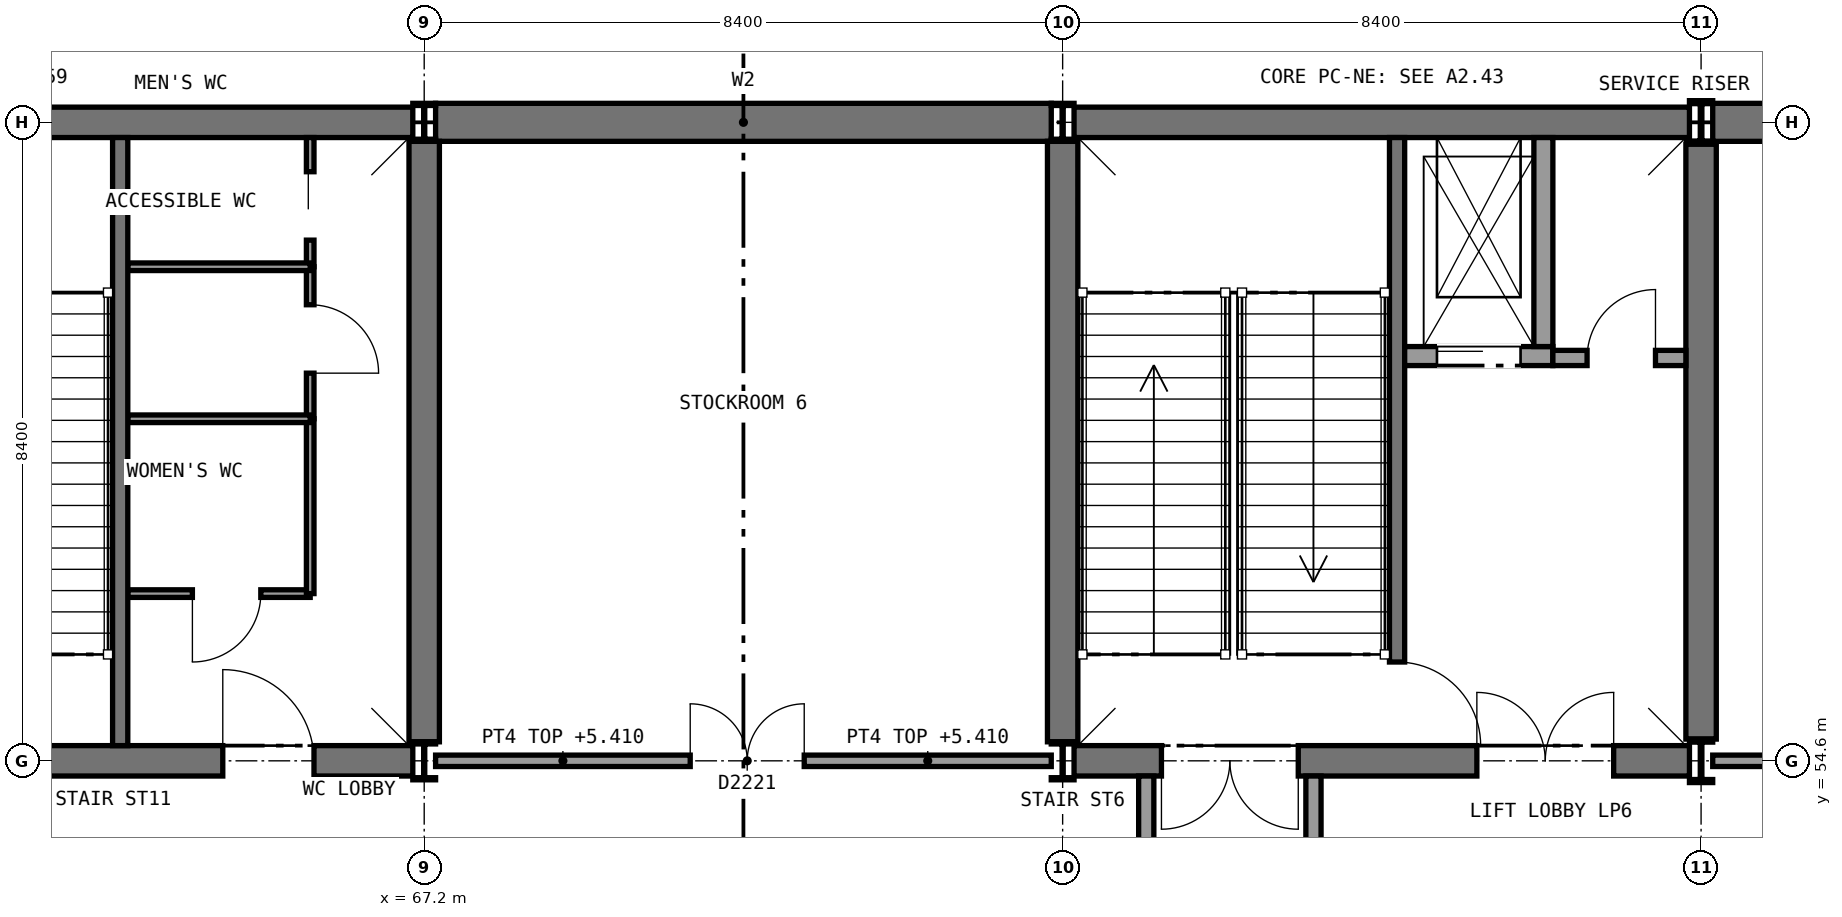
"""IFC4 building model, lengths in metres.
Left out: names, types, materials, properties, quantities, classifications, styles, units other than length and angle.
Written with IfcOpenShell. Run it as: python <this file> out.ifc"""

import sys

from ifc_helpers import new_model, si_unit, direction, frame, frame_2d, origin, origin_2d, place, context, subcontext, project, spatial, rectangle, i_section, extrude, element, fill, save


model = new_model("IFC4")
c1 = context("Model", 3, precision=1e-05, world=origin(), true_north=direction((0.0, 1.0)))
c2 = subcontext(c1, "Body", "Model", "MODEL_VIEW")
j1 = project(units=[si_unit("LENGTHUNIT", "METRE"), si_unit("PLANEANGLEUNIT", "RADIAN")], contexts=[c1])
p1 = place(None, origin())
s1 = spatial("IfcSite", under=j1, at=p1, CompositionType="ELEMENT")
p2 = place(p1, origin())
s2 = spatial("IfcBuilding", under=s1, at=p2, CompositionType="ELEMENT")
p3 = place(p2, origin())
s3 = spatial("IfcBuildingStorey", under=s2, at=p3, CompositionType="ELEMENT", Elevation=0.0)
p4 = place(p3, frame((67.35, 63.0, 0.0), z_axis=(0.0, 0.0, 1.0), x_axis=(1.0, 0.0, 0.0)))
e1 = element("IfcWall", 1, at=p4, inside=s3, PredefinedType="SHEAR", context=c2, shape_type="SweptSolid", body=[
    extrude(rectangle(XDim=8.1, YDim=0.5, at=frame_2d((4.05, 0.0))), origin(), (0.0, 0.0, 1.0), 5.85),
])
p5 = place(p3, frame((84.153, 63.0, 0.0), z_axis=(0.0, 0.0, 1.0), x_axis=(1.0, 0.0, 0.0)))
e2 = element("IfcWall", 2, at=p5, inside=s3, PredefinedType="SHEAR", context=c2, shape_type="SweptSolid", body=[
    extrude(rectangle(XDim=8.094, YDim=0.5, at=frame_2d((4.047, 0.0))), origin(), (0.0, 0.0, 1.0), 5.85),
])
p6 = place(p3, frame((75.75, 63.0, 0.0), z_axis=(0.0, 0.0, 1.0), x_axis=(1.0, 0.0, 0.0)))
e3 = element("IfcWall", 3, at=p6, inside=s3, PredefinedType="SHEAR", context=c2, shape_type="SweptSolid", body=[
    extrude(rectangle(XDim=8.097, YDim=0.4, at=frame_2d((4.048, 0.0))), origin(), (0.0, 0.0, 1.0), 5.85),
])
p7 = place(p3, frame((75.75, 54.6, 0.0), z_axis=(0.0, 0.0, 1.0), x_axis=(1.0, 0.0, 0.0)))
e4 = element("IfcWall", 4, at=p7, inside=s3, PredefinedType="SHEAR", context=c2, shape_type="SweptSolid", body=[
    extrude(rectangle(XDim=8.097, YDim=0.4, at=frame_2d((4.048, 0.0))), origin(), (0.0, 0.0, 1.0), 5.85),
])
p8 = place(p7, frame((5.3, 0.0, 0.0)))
e5 = element("IfcOpeningElement", 5, at=p8, cuts=e4, PredefinedType="OPENING", context=c2, shape_type="SweptSolid", body=[
    extrude(rectangle(XDim=1.8, YDim=2.1, at=frame_2d((0.9, 1.05))), frame((0.0, 0.21, 0.0), z_axis=(0.0, -1.0, 0.0), x_axis=(1.0, 0.0, 0.0)), (0.0, 0.0, 1.0), 0.42),
])
p9 = place(p7, frame((1.15, 0.0, 0.0)))
e6 = element("IfcOpeningElement", 6, at=p9, cuts=e4, PredefinedType="OPENING", context=c2, shape_type="SweptSolid", body=[
    extrude(rectangle(XDim=1.8, YDim=2.1, at=frame_2d((0.9, 1.05))), frame((0.0, 0.21, 0.0), z_axis=(0.0, -1.0, 0.0), x_axis=(1.0, 0.0, 0.0)), (0.0, 0.0, 1.0), 0.42),
])
p10 = place(p3, frame((75.6, 54.85, 0.0), z_axis=(0.0, 0.0, 1.0), x_axis=(0.0, 1.0, 0.0)))
e7 = element("IfcWall", 7, at=p10, inside=s3, PredefinedType="SHEAR", context=c2, shape_type="SweptSolid", body=[
    extrude(rectangle(XDim=7.9, YDim=0.4, at=frame_2d((3.95, 0.0))), origin(), (0.0, 0.0, 1.0), 5.85),
])
p11 = place(p3, frame((84.0, 54.886, 0.0), z_axis=(0.0, 0.0, 1.0), x_axis=(0.0, 1.0, 0.0)))
e8 = element("IfcWall", 8, at=p11, inside=s3, PredefinedType="SHEAR", context=c2, shape_type="SweptSolid", body=[
    extrude(rectangle(XDim=7.828, YDim=0.4, at=frame_2d((3.914, 0.0))), origin(), (0.0, 0.0, 1.0), 5.85),
])
p12 = place(p3, frame((58.95, 63.0, 0.0), z_axis=(0.0, 0.0, 1.0), x_axis=(1.0, 0.0, 0.0)))
e9 = element("IfcWall", 9, at=p12, inside=s3, PredefinedType="SHEAR", context=c2, shape_type="SweptSolid", body=[
    extrude(rectangle(XDim=8.1, YDim=0.4, at=frame_2d((4.05, 0.0))), origin(), (0.0, 0.0, 1.0), 5.85),
])
p13 = place(p3, frame((58.95, 54.6, 0.0), z_axis=(0.0, 0.0, 1.0), x_axis=(1.0, 0.0, 0.0)))
e10 = element("IfcWall", 10, at=p13, inside=s3, PredefinedType="SHEAR", context=c2, shape_type="SweptSolid", body=[
    extrude(rectangle(XDim=8.1, YDim=0.4, at=frame_2d((4.05, 0.0))), origin(), (0.0, 0.0, 1.0), 5.85),
])
p14 = place(p13, frame((5.6, 0.0, 0.0)))
e11 = element("IfcOpeningElement", 11, at=p14, cuts=e10, PredefinedType="OPENING", context=c2, shape_type="SweptSolid", body=[
    extrude(rectangle(XDim=1.2, YDim=2.1, at=frame_2d((0.6, 1.05))), frame((0.0, 0.21, 0.0), z_axis=(0.0, -1.0, 0.0), x_axis=(1.0, 0.0, 0.0)), (0.0, 0.0, 1.0), 0.42),
])
p15 = place(p13, frame((1.15, 0.0, 0.0)))
e12 = element("IfcOpeningElement", 12, at=p15, cuts=e10, PredefinedType="OPENING", context=c2, shape_type="SweptSolid", body=[
    extrude(rectangle(XDim=1.8, YDim=2.1, at=frame_2d((0.9, 1.05))), frame((0.0, 0.21, 0.0), z_axis=(0.0, -1.0, 0.0), x_axis=(1.0, 0.0, 0.0)), (0.0, 0.0, 1.0), 0.42),
])
p16 = place(p3, frame((67.2, 54.85, 0.0), z_axis=(0.0, 0.0, 1.0), x_axis=(0.0, 1.0, 0.0)))
e13 = element("IfcWall", 13, at=p16, inside=s3, PredefinedType="SHEAR", context=c2, shape_type="SweptSolid", body=[
    extrude(rectangle(XDim=7.9, YDim=0.4, at=frame_2d((3.95, 0.0))), origin(), (0.0, 0.0, 1.0), 5.85),
])
for number, where, z_axis, x_axis in (
    (14, (67.2, 54.6, 0.0), (0.0, 0.0, 1.0), (1.0, 0.0, 0.0)),
    (15, (67.2, 63.0, 0.0), (0.0, 0.0, 1.0), (1.0, 0.0, 0.0)),
    (16, (75.6, 54.6, 0.0), (0.0, 0.0, 1.0), (1.0, 0.0, 0.0)),
    (17, (75.6, 63.0, 0.0), (0.0, 0.0, 1.0), (1.0, 0.0, 0.0)),
):
    element("IfcColumn", number, at=place(p3, frame(where, z_axis=z_axis, x_axis=x_axis)), inside=s3, PredefinedType="COLUMN", context=c2, shape_type="SweptSolid", body=[
        extrude(i_section(OverallWidth=0.3, OverallDepth=0.5, WebThickness=0.014, FlangeThickness=0.028, FilletRadius=0.027, at=origin_2d()), origin(), (0.0, 0.0, 1.0), 6.0),
    ])
for number, where, z_axis, x_axis in (
    (18, (84.0, 54.6, 0.0), (0.0, 0.0, 1.0), (1.0, 0.0, 0.0)),
    (19, (84.0, 63.0, 0.0), (0.0, 0.0, 1.0), (1.0, 0.0, 0.0)),
):
    element("IfcColumn", number, at=place(p3, frame(where, z_axis=z_axis, x_axis=x_axis)), inside=s3, PredefinedType="COLUMN", context=c2, shape_type="SweptSolid", body=[
        extrude(i_section(OverallWidth=0.306, OverallDepth=0.572, WebThickness=0.021, FlangeThickness=0.04, FilletRadius=0.027, at=origin_2d()), origin(), (0.0, 0.0, 1.0), 6.0),
    ])
p17 = place(p3, frame((63.3, 56.8, 0.0), z_axis=(0.0, 0.0, 1.0), x_axis=(1.0, 0.0, 0.0)))
e20 = element("IfcWall", 20, at=p17, inside=s3, PredefinedType="PARTITIONING", context=c2, shape_type="SweptSolid", body=[
    extrude(rectangle(XDim=2.4, YDim=0.1, at=frame_2d((1.2, 0.0))), origin(), (0.0, 0.0, 1.0), 5.78),
])
p18 = place(p17, frame((0.85, 0.0, 0.0)))
e21 = element("IfcOpeningElement", 21, at=p18, cuts=e20, PredefinedType="OPENING", context=c2, shape_type="SweptSolid", body=[
    extrude(rectangle(XDim=0.9, YDim=2.1, at=frame_2d((0.45, 1.05))), frame((0.0, 0.06, 0.0), z_axis=(0.0, -1.0, 0.0), x_axis=(1.0, 0.0, 0.0)), (0.0, 0.0, 1.0), 0.12),
])
p19 = place(p3, frame((65.7, 56.8, 0.0), z_axis=(0.0, 0.0, 1.0), x_axis=(0.0, 1.0, 0.0)))
e22 = element("IfcWall", 22, at=p19, inside=s3, PredefinedType="PARTITIONING", context=c2, shape_type="SweptSolid", body=[
    extrude(rectangle(XDim=2.3, YDim=0.1, at=frame_2d((1.15, 0.0))), origin(), (0.0, 0.0, 1.0), 5.78),
])
p20 = place(p3, frame((65.7, 59.1, 0.0), z_axis=(0.0, 0.0, 1.0), x_axis=(0.0, 1.0, 0.0)))
e23 = element("IfcWall", 23, at=p20, inside=s3, PredefinedType="PARTITIONING", context=c2, shape_type="SweptSolid", body=[
    extrude(rectangle(XDim=2.0, YDim=0.1, at=frame_2d((1.0, 0.0))), origin(), (0.0, 0.0, 1.0), 5.78),
])
p21 = place(p20, frame((0.6, 0.0, 0.0)))
e24 = element("IfcOpeningElement", 24, at=p21, cuts=e23, PredefinedType="OPENING", context=c2, shape_type="SweptSolid", body=[
    extrude(rectangle(XDim=0.9, YDim=2.1, at=frame_2d((0.45, 1.05))), frame((0.0, 0.06, 0.0), z_axis=(0.0, -1.0, 0.0), x_axis=(1.0, 0.0, 0.0)), (0.0, 0.0, 1.0), 0.12),
])
p22 = place(p3, frame((65.7, 61.1, 0.0), z_axis=(0.0, 0.0, 1.0), x_axis=(0.0, 1.0, 0.0)))
e25 = element("IfcWall", 25, at=p22, inside=s3, PredefinedType="PARTITIONING", context=c2, shape_type="SweptSolid", body=[
    extrude(rectangle(XDim=1.7, YDim=0.1, at=frame_2d((0.85, 0.0))), origin(), (0.0, 0.0, 1.0), 5.78),
])
p23 = place(p22, frame((0.35, 0.0, 0.0)))
e26 = element("IfcOpeningElement", 26, at=p23, cuts=e25, PredefinedType="OPENING", context=c2, shape_type="SweptSolid", body=[
    extrude(rectangle(XDim=0.9, YDim=2.1, at=frame_2d((0.45, 1.05))), frame((0.0, 0.06, 0.0), z_axis=(0.0, -1.0, 0.0), x_axis=(1.0, 0.0, 0.0)), (0.0, 0.0, 1.0), 0.12),
])
for number, where, z_axis, x_axis in (
    (27, (63.3, 59.1, 0.0), (0.0, 0.0, 1.0), (1.0, 0.0, 0.0)),
    (28, (63.3, 61.1, 0.0), (0.0, 0.0, 1.0), (1.0, 0.0, 0.0)),
):
    element("IfcWall", number, at=place(p3, frame(where, z_axis=z_axis, x_axis=x_axis)), inside=s3, PredefinedType="PARTITIONING", context=c2, shape_type="SweptSolid", body=[
        extrude(rectangle(XDim=2.4, YDim=0.1, at=frame_2d((1.2, 0.0))), origin(), (0.0, 0.0, 1.0), 5.78),
    ])
p24 = place(p3, frame((67.35, 54.6, 0.0), z_axis=(0.0, 0.0, 1.0), x_axis=(1.0, 0.0, 0.0)))
e29 = element("IfcWall", 29, at=p24, inside=s3, PredefinedType="SOLIDWALL", context=c2, shape_type="SweptSolid", body=[
    extrude(rectangle(XDim=8.1, YDim=0.15, at=frame_2d((4.05, 0.0))), origin(), (0.0, 0.0, 1.0), 5.41),
])
p25 = place(p24, frame((3.35, 0.0, 0.0)))
e30 = element("IfcOpeningElement", 30, at=p25, cuts=e29, PredefinedType="OPENING", context=c2, shape_type="SweptSolid", body=[
    extrude(rectangle(XDim=1.5, YDim=2.1, at=frame_2d((0.75, 1.05))), frame((0.0, 0.085, 0.0), z_axis=(0.0, -1.0, 0.0), x_axis=(1.0, 0.0, 0.0)), (0.0, 0.0, 1.0), 0.17),
])
p26 = place(p3, frame((84.153, 54.6, 0.0), z_axis=(0.0, 0.0, 1.0), x_axis=(1.0, 0.0, 0.0)))
e31 = element("IfcWall", 31, at=p26, inside=s3, PredefinedType="SOLIDWALL", context=c2, shape_type="SweptSolid", body=[
    extrude(rectangle(XDim=8.094, YDim=0.15, at=frame_2d((4.047, 0.0))), origin(), (0.0, 0.0, 1.0), 5.52),
])
p27 = place(p26, frame((3.35, 0.0, 0.0)))
e32 = element("IfcOpeningElement", 32, at=p27, cuts=e31, PredefinedType="OPENING", context=c2, shape_type="SweptSolid", body=[
    extrude(rectangle(XDim=1.5, YDim=2.1, at=frame_2d((0.75, 1.05))), frame((0.0, 0.085, 0.0), z_axis=(0.0, -1.0, 0.0), x_axis=(1.0, 0.0, 0.0)), (0.0, 0.0, 1.0), 0.17),
])
p28 = place(p3, frame((80.0, 62.8, 0.0), z_axis=(0.0, 0.0, 1.0), x_axis=(0.0, -1.0, 0.0)))
e33 = element("IfcWall", 33, at=p28, inside=s3, PredefinedType="SHEAR", context=c2, shape_type="SweptSolid", body=[
    extrude(rectangle(XDim=8.0, YDim=0.2, at=frame_2d((4.0, 0.0))), origin(), (0.0, 0.0, 1.0), 5.85),
])
p29 = place(p28, frame((6.9, 0.0, 0.0)))
e34 = element("IfcOpeningElement", 34, at=p29, cuts=e33, PredefinedType="OPENING", context=c2, shape_type="SweptSolid", body=[
    extrude(rectangle(XDim=1.11, YDim=2.1, at=frame_2d((0.555, 1.05))), frame((0.0, 0.11, 0.0), z_axis=(0.0, -1.0, 0.0), x_axis=(1.0, 0.0, 0.0)), (0.0, 0.0, 1.0), 0.22),
])
p30 = place(p3, frame((80.1, 59.925, 0.0), z_axis=(0.0, 0.0, 1.0), x_axis=(1.0, 0.0, 0.0)))
e35 = element("IfcWall", 35, at=p30, inside=s3, PredefinedType="SOLIDWALL", context=c2, shape_type="SweptSolid", body=[
    extrude(rectangle(XDim=1.95, YDim=0.25, at=frame_2d((0.975, 0.0))), origin(), (0.0, 0.0, 1.0), 6.0),
])
p31 = place(p30, frame((0.425, 0.0, 0.0)))
e36 = element("IfcOpeningElement", 36, at=p31, cuts=e35, PredefinedType="OPENING", context=c2, shape_type="SweptSolid", body=[
    extrude(rectangle(XDim=1.1, YDim=2.1, at=frame_2d((0.55, 1.05))), frame((0.0, 0.135, 0.0), z_axis=(0.0, -1.0, 0.0), x_axis=(1.0, 0.0, 0.0)), (0.0, 0.0, 1.0), 0.27),
])
p32 = place(p3, frame((81.925, 62.8, 0.0), z_axis=(0.0, 0.0, 1.0), x_axis=(0.0, -1.0, 0.0)))
e37 = element("IfcWall", 37, at=p32, inside=s3, PredefinedType="SOLIDWALL", context=c2, shape_type="SweptSolid", body=[
    extrude(rectangle(XDim=2.75, YDim=0.25, at=frame_2d((1.375, 0.0))), origin(), (0.0, 0.0, 1.0), 6.0),
])
p33 = place(p3, frame((82.05, 59.9, 0.0), z_axis=(0.0, 0.0, 1.0), x_axis=(1.0, 0.0, 0.0)))
e38 = element("IfcWall", 38, at=p33, inside=s3, PredefinedType="PARTITIONING", context=c2, shape_type="SweptSolid", body=[
    extrude(rectangle(XDim=1.75, YDim=0.2, at=frame_2d((0.875, 0.0))), origin(), (0.0, 0.0, 1.0), 5.85),
])
p34 = place(p33, frame((0.45, 0.0, 0.0)))
e39 = element("IfcOpeningElement", 39, at=p34, cuts=e38, PredefinedType="OPENING", context=c2, shape_type="SweptSolid", body=[
    extrude(rectangle(XDim=0.9, YDim=2.1, at=frame_2d((0.45, 1.05))), frame((0.0, 0.11, 0.0), z_axis=(0.0, -1.0, 0.0), x_axis=(1.0, 0.0, 0.0)), (0.0, 0.0, 1.0), 0.22),
])
p35 = place(p3, frame((63.2, 62.8, 0.0), z_axis=(0.0, 0.0, 1.0), x_axis=(0.0, -1.0, 0.0)))
e40 = element("IfcWall", 40, at=p35, inside=s3, PredefinedType="SHEAR", context=c2, shape_type="SweptSolid", body=[
    extrude(rectangle(XDim=8.0, YDim=0.2, at=frame_2d((4.0, 0.0))), origin(), (0.0, 0.0, 1.0), 5.85),
])
for number, where, z_axis, x_axis in (
    (41, (76.7, 54.4, 0.0), (0.0, 0.0, 1.0), (0.0, -1.0, 0.0)),
    (42, (78.9, 54.4, 0.0), (0.0, 0.0, 1.0), (0.0, -1.0, 0.0)),
):
    element("IfcWall", number, at=place(p3, frame(where, z_axis=z_axis, x_axis=x_axis)), inside=s3, PredefinedType="PARTITIONING", context=c2, shape_type="SweptSolid", body=[
        extrude(rectangle(XDim=16.4, YDim=0.2, at=frame_2d((8.2, 0.0))), origin(), (0.0, 0.0, 1.0), 5.85),
    ])
p36 = place(p18, frame((0.9, 0.0, 0.0), z_axis=(0.0, 0.0, 1.0), x_axis=(-1.0, 0.0, 0.0)))
e43 = element("IfcDoor", 43, at=p36, inside=s3, OperationType="SINGLE_SWING_RIGHT", PredefinedType="DOOR", context=c2, shape_type="SweptSolid", body=[
    extrude(rectangle(XDim=0.9, YDim=2.1, at=frame_2d((0.45, 1.05))), frame((0.0, 0.025, 0.0), z_axis=(0.0, -1.0, 0.0), x_axis=(1.0, 0.0, 0.0)), (0.0, 0.0, 1.0), 0.05),
])
fill(e21, e43)
p37 = place(p21, frame((0.9, 0.0, 0.0), z_axis=(0.0, 0.0, 1.0), x_axis=(-1.0, 0.0, 0.0)))
e44 = element("IfcDoor", 44, at=p37, inside=s3, OperationType="SINGLE_SWING_RIGHT", PredefinedType="DOOR", context=c2, shape_type="SweptSolid", body=[
    extrude(rectangle(XDim=0.9, YDim=2.1, at=frame_2d((0.45, 1.05))), frame((0.0, 0.025, 0.0), z_axis=(0.0, -1.0, 0.0), x_axis=(1.0, 0.0, 0.0)), (0.0, 0.0, 1.0), 0.05),
])
fill(e24, e44)
p38 = place(p23, origin())
e45 = element("IfcDoor", 45, at=p38, inside=s3, OperationType="SLIDING_TO_RIGHT", PredefinedType="DOOR", context=c2, shape_type="SweptSolid", body=[
    extrude(rectangle(XDim=0.9, YDim=2.1, at=frame_2d((0.45, 1.05))), frame((0.0, 0.025, 0.0), z_axis=(0.0, -1.0, 0.0), x_axis=(1.0, 0.0, 0.0)), (0.0, 0.0, 1.0), 0.05),
])
fill(e26, e45)
p39 = place(p25, origin())
e46 = element("IfcDoor", 46, at=p39, inside=s3, OperationType="DOUBLE_DOOR_SINGLE_SWING", PredefinedType="DOOR", context=c2, shape_type="SweptSolid", body=[
    extrude(rectangle(XDim=1.5, YDim=2.1, at=frame_2d((0.75, 1.05))), frame((0.0, 0.025, 0.0), z_axis=(0.0, -1.0, 0.0), x_axis=(1.0, 0.0, 0.0)), (0.0, 0.0, 1.0), 0.05),
])
fill(e30, e46)
p40 = place(p29, origin())
e47 = element("IfcDoor", 47, at=p40, inside=s3, OperationType="SINGLE_SWING_RIGHT", PredefinedType="DOOR", context=c2, shape_type="SweptSolid", body=[
    extrude(rectangle(XDim=1.1, YDim=2.1, at=frame_2d((0.55, 1.05))), frame((0.0, 0.025, 0.0), z_axis=(0.0, -1.0, 0.0), x_axis=(1.0, 0.0, 0.0)), (0.0, 0.0, 1.0), 0.05),
])
fill(e34, e47)
p41 = place(p31, frame((1.1, 0.0, 0.0), z_axis=(0.0, 0.0, 1.0), x_axis=(-1.0, 0.0, 0.0)))
e48 = element("IfcDoor", 48, at=p41, inside=s3, OperationType="SLIDING_TO_RIGHT", PredefinedType="DOOR", context=c2, shape_type="SweptSolid", body=[
    extrude(rectangle(XDim=1.1, YDim=2.1, at=frame_2d((0.55, 1.05))), frame((0.0, 0.025, 0.0), z_axis=(0.0, -1.0, 0.0), x_axis=(1.0, 0.0, 0.0)), (0.0, 0.0, 1.0), 0.05),
])
fill(e36, e48)
p42 = place(p34, origin())
e49 = element("IfcDoor", 49, at=p42, inside=s3, OperationType="SINGLE_SWING_RIGHT", PredefinedType="DOOR", context=c2, shape_type="SweptSolid", body=[
    extrude(rectangle(XDim=0.9, YDim=2.1, at=frame_2d((0.45, 1.05))), frame((0.0, 0.025, 0.0), z_axis=(0.0, -1.0, 0.0), x_axis=(1.0, 0.0, 0.0)), (0.0, 0.0, 1.0), 0.05),
])
fill(e39, e49)
p43 = place(p8, origin())
e50 = element("IfcDoor", 50, at=p43, inside=s3, OperationType="DOUBLE_DOOR_SINGLE_SWING", PredefinedType="DOOR", context=c2, shape_type="SweptSolid", body=[
    extrude(rectangle(XDim=1.8, YDim=2.1, at=frame_2d((0.9, 1.05))), frame((0.0, 0.025, 0.0), z_axis=(0.0, -1.0, 0.0), x_axis=(1.0, 0.0, 0.0)), (0.0, 0.0, 1.0), 0.05),
])
fill(e5, e50)
p44 = place(p14, origin())
e51 = element("IfcDoor", 51, at=p44, inside=s3, OperationType="SINGLE_SWING_LEFT", PredefinedType="DOOR", context=c2, shape_type="SweptSolid", body=[
    extrude(rectangle(XDim=1.2, YDim=2.1, at=frame_2d((0.6, 1.05))), frame((0.0, 0.025, 0.0), z_axis=(0.0, -1.0, 0.0), x_axis=(1.0, 0.0, 0.0)), (0.0, 0.0, 1.0), 0.05),
])
fill(e11, e51)
p45 = place(p9, frame((1.8, 0.0, 0.0), z_axis=(0.0, 0.0, 1.0), x_axis=(-1.0, 0.0, 0.0)))
e52 = element("IfcDoor", 52, at=p45, inside=s3, OperationType="DOUBLE_DOOR_SINGLE_SWING", PredefinedType="DOOR", context=c2, shape_type="SweptSolid", body=[
    extrude(rectangle(XDim=1.8, YDim=2.1, at=frame_2d((0.9, 1.05))), frame((0.0, 0.025, 0.0), z_axis=(0.0, -1.0, 0.0), x_axis=(1.0, 0.0, 0.0)), (0.0, 0.0, 1.0), 0.05),
])
fill(e6, e52)
save(model, sys.argv[1])
